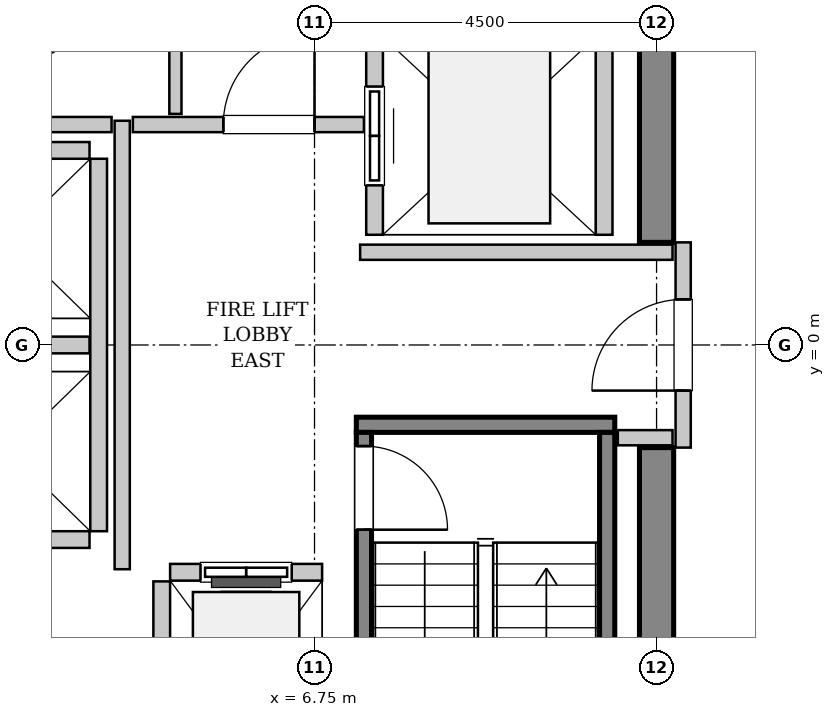
"""IFC4 building model, lengths in metres.
Left out: names, types, materials, properties, quantities, classifications, styles, units other than length and angle.
Written with IfcOpenShell. Run it as: python <this file> out.ifc"""

import sys

from ifc_helpers import new_model, si_unit, direction, frame, frame_2d, origin, place, context, subcontext, project, spatial, rectangle, extrude, source, transform, mapped, element, fill, save


model = new_model("IFC4")
c1 = context("Model", 3, precision=1e-05, world=origin(), true_north=direction((0.0, 1.0)))
c2 = subcontext(c1, "Body", "Model", "MODEL_VIEW")
j1 = project(units=[si_unit("LENGTHUNIT", "METRE"), si_unit("PLANEANGLEUNIT", "RADIAN")], contexts=[c1])
p1 = place(None, origin())
s1 = spatial("IfcSite", under=j1, at=p1, CompositionType="ELEMENT")
p2 = place(p1, origin())
s2 = spatial("IfcBuilding", under=s1, at=p2, CompositionType="ELEMENT")
p3 = place(p2, frame((0.0, 0.0, 252.2)))
s3 = spatial("IfcBuildingStorey", under=s2, at=p3, CompositionType="ELEMENT", Elevation=252.2)
m1 = source(origin(), c2, "Body", "SweptSolid", [
    extrude(rectangle(XDim=7.425, YDim=0.45, at=frame_2d((3.712, 0.0))), origin(), (0.0, 0.0, 1.0), 3.8),
])
for number, where, z_axis, x_axis in (
    (1, (11.25, -8.775, 0.0), (0.0, 0.0, 1.0), (0.0, 1.0, 0.0)),
    (2, (11.25, 1.35, 0.0), (0.0, 0.0, 1.0), (0.0, 1.0, 0.0)),
):
    element("IfcWall", number, at=place(p3, frame(where, z_axis=z_axis, x_axis=x_axis)), inside=s3, PredefinedType="SHEAR", context=c2, shape_type="MappedRepresentation", body=[
        mapped(m1, transform((0.0, 0.0, 0.0), x_axis=(1.0, 0.0, 0.0), y_axis=(0.0, 1.0, 0.0), z_axis=(0.0, 0.0, 1.0), scale=1.0)),
    ])
m2 = source(origin(), c2, "Body", "SweptSolid", [
    extrude(rectangle(XDim=3.4, YDim=0.2, at=frame_2d((1.7, 0.0))), origin(), (0.0, 0.0, 1.0), 3.8),
])
p4 = place(p3, frame((7.3, -1.05, 0.0), z_axis=(0.0, 0.0, 1.0), x_axis=(1.0, 0.0, 0.0)))
e3 = element("IfcWall", 3, at=p4, inside=s3, PredefinedType="SOLIDWALL", context=c2, shape_type="MappedRepresentation", body=[
    mapped(m2, transform((0.0, 0.0, 0.0), x_axis=(1.0, 0.0, 0.0), y_axis=(0.0, 1.0, 0.0), z_axis=(0.0, 0.0, 1.0), scale=1.0)),
])
m3 = source(origin(), c2, "Body", "SweptSolid", [
    extrude(rectangle(XDim=7.1, YDim=0.2, at=frame_2d((3.55, 0.0))), origin(), (0.0, 0.0, 1.0), 3.8),
])
p5 = place(p3, frame((7.4, -1.15, 0.0), z_axis=(0.0, 0.0, 1.0), x_axis=(0.0, -1.0, 0.0)))
e4 = element("IfcWall", 4, at=p5, inside=s3, PredefinedType="SOLIDWALL", context=c2, shape_type="MappedRepresentation", body=[
    mapped(m3, transform((0.0, 0.0, 0.0), x_axis=(1.0, 0.0, 0.0), y_axis=(0.0, 1.0, 0.0), z_axis=(0.0, 0.0, 1.0), scale=1.0)),
])
p6 = place(p5, frame((0.18, 0.0, 0.0)))
e5 = element("IfcOpeningElement", 5, at=p6, cuts=e4, PredefinedType="OPENING", context=c2, shape_type="SweptSolid", body=[
    extrude(rectangle(XDim=1.1, YDim=2.15, at=frame_2d((0.55, 1.075))), frame((0.0, 0.11, 0.0), z_axis=(0.0, -1.0, 0.0), x_axis=(1.0, 0.0, 0.0)), (0.0, 0.0, 1.0), 0.22),
])
p7 = place(p3, frame((10.6, -1.15, 0.0), z_axis=(0.0, 0.0, 1.0), x_axis=(0.0, -1.0, 0.0)))
e6 = element("IfcWall", 6, at=p7, inside=s3, PredefinedType="SOLIDWALL", context=c2, shape_type="MappedRepresentation", body=[
    mapped(m3, transform((0.0, 0.0, 0.0), x_axis=(1.0, 0.0, 0.0), y_axis=(0.0, 1.0, 0.0), z_axis=(0.0, 0.0, 1.0), scale=1.0)),
])
m4 = source(origin(), c2, "Body", "SweptSolid", [
    extrude(rectangle(XDim=2.0, YDim=0.22, at=frame_2d((1.0, 0.0))), origin(), (0.0, 0.0, 1.0), 3.535),
])
p8 = place(p3, frame((6.85, -2.99, 0.0), z_axis=(0.0, 0.0, 1.0), x_axis=(-1.0, 0.0, 0.0)))
e7 = element("IfcWall", 7, at=p8, inside=s3, PredefinedType="SOLIDWALL", context=c2, shape_type="MappedRepresentation", body=[
    mapped(m4, transform((0.0, 0.0, 0.0), x_axis=(1.0, 0.0, 0.0), y_axis=(0.0, 1.0, 0.0), z_axis=(0.0, 0.0, 1.0), scale=1.0)),
])
p9 = place(p8, frame((0.4, 0.0, 0.0)))
e8 = element("IfcOpeningElement", 8, at=p9, cuts=e7, PredefinedType="OPENING", context=c2, shape_type="SweptSolid", body=[
    extrude(rectangle(XDim=1.2, YDim=2.2, at=frame_2d((0.6, 1.1))), frame((0.0, 0.12, 0.0), z_axis=(0.0, -1.0, 0.0), x_axis=(1.0, 0.0, 0.0)), (0.0, 0.0, 1.0), 0.24),
])
m5 = source(origin(), c2, "Body", "SweptSolid", [
    extrude(rectangle(XDim=2.68, YDim=0.22, at=frame_2d((1.34, 0.0))), origin(), (0.0, 0.0, 1.0), 3.535),
])
p10 = place(p3, frame((4.74, -3.11, 0.0), z_axis=(0.0, 0.0, 1.0), x_axis=(0.0, -1.0, 0.0)))
e9 = element("IfcWall", 9, at=p10, inside=s3, PredefinedType="SOLIDWALL", context=c2, shape_type="MappedRepresentation", body=[
    mapped(m5, transform((0.0, 0.0, 0.0), x_axis=(1.0, 0.0, 0.0), y_axis=(0.0, 1.0, 0.0), z_axis=(0.0, 0.0, 1.0), scale=1.0)),
])
m6 = source(origin(), c2, "Body", "SweptSolid", [
    extrude(rectangle(XDim=5.45, YDim=0.22, at=frame_2d((2.725, 0.0))), origin(), (0.0, 0.0, 1.0), 3.535),
])
p11 = place(p3, frame((7.54, 6.9, 0.0), z_axis=(0.0, 0.0, 1.0), x_axis=(0.0, -1.0, 0.0)))
e10 = element("IfcWall", 10, at=p11, inside=s3, PredefinedType="SOLIDWALL", context=c2, shape_type="MappedRepresentation", body=[
    mapped(m6, transform((0.0, 0.0, 0.0), x_axis=(1.0, 0.0, 0.0), y_axis=(0.0, 1.0, 0.0), z_axis=(0.0, 0.0, 1.0), scale=1.0)),
])
p12 = place(p11, frame((3.5, 0.0, 0.0)))
e11 = element("IfcOpeningElement", 11, at=p12, cuts=e10, PredefinedType="OPENING", context=c2, shape_type="SweptSolid", body=[
    extrude(rectangle(XDim=1.3, YDim=2.3, at=frame_2d((0.65, 1.15))), frame((0.0, 0.12, 0.0), z_axis=(0.0, -1.0, 0.0), x_axis=(1.0, 0.0, 0.0)), (0.0, 0.0, 1.0), 0.24),
])
p13 = place(p11, frame((0.65, 0.0, 0.0)))
e12 = element("IfcOpeningElement", 12, at=p13, cuts=e10, PredefinedType="OPENING", context=c2, shape_type="SweptSolid", body=[
    extrude(rectangle(XDim=1.3, YDim=2.3, at=frame_2d((0.65, 1.15))), frame((0.0, 0.12, 0.0), z_axis=(0.0, -1.0, 0.0), x_axis=(1.0, 0.0, 0.0)), (0.0, 0.0, 1.0), 0.24),
])
p14 = place(p3, frame((10.56, 1.45, 0.0), z_axis=(0.0, 0.0, 1.0), x_axis=(0.0, 1.0, 0.0)))
e13 = element("IfcWall", 13, at=p14, inside=s3, PredefinedType="SOLIDWALL", context=c2, shape_type="MappedRepresentation", body=[
    mapped(m6, transform((0.0, 0.0, 0.0), x_axis=(1.0, 0.0, 0.0), y_axis=(0.0, 1.0, 0.0), z_axis=(0.0, 0.0, 1.0), scale=1.0)),
])
m7 = source(origin(), c2, "Body", "SweptSolid", [
    extrude(rectangle(XDim=4.9, YDim=0.22, at=frame_2d((2.45, 0.0))), origin(), (0.0, 0.0, 1.0), 3.535),
])
p15 = place(p3, frame((3.91, -2.45, 0.0), z_axis=(0.0, 0.0, 1.0), x_axis=(0.0, 1.0, 0.0)))
e14 = element("IfcWall", 14, at=p15, inside=s3, PredefinedType="SOLIDWALL", context=c2, shape_type="MappedRepresentation", body=[
    mapped(m7, transform((0.0, 0.0, 0.0), x_axis=(1.0, 0.0, 0.0), y_axis=(0.0, 1.0, 0.0), z_axis=(0.0, 0.0, 1.0), scale=1.0)),
])
m8 = source(origin(), c2, "Body", "SweptSolid", [
    extrude(rectangle(XDim=2.13, YDim=0.22, at=frame_2d((1.065, 0.0))), origin(), (0.0, 0.0, 1.0), 3.535),
])
for number, where, z_axis, x_axis in (
    (15, (1.66, -2.56, 0.0), (0.0, 0.0, 1.0), (1.0, 0.0, 0.0)),
    (16, (1.66, 0.0, 0.0), (0.0, 0.0, 1.0), (1.0, 0.0, 0.0)),
    (17, (3.79, 2.56, 0.0), (0.0, 0.0, 1.0), (-1.0, 0.0, 0.0)),
):
    element("IfcWall", number, at=place(p3, frame(where, z_axis=z_axis, x_axis=x_axis)), inside=s3, PredefinedType="SOLIDWALL", context=c2, shape_type="MappedRepresentation", body=[
        mapped(m8, transform((0.0, 0.0, 0.0), x_axis=(1.0, 0.0, 0.0), y_axis=(0.0, 1.0, 0.0), z_axis=(0.0, 0.0, 1.0), scale=1.0)),
    ])
m9 = source(origin(), c2, "Body", "SweptSolid", [
    extrude(rectangle(XDim=2.7, YDim=0.2, at=frame_2d((1.35, 0.0))), origin(), (0.0, 0.0, 1.0), 2.625),
])
p16 = place(p3, frame((11.6, -1.35, 0.0), z_axis=(0.0, 0.0, 1.0), x_axis=(0.0, 1.0, 0.0)))
e18 = element("IfcWall", 18, at=p16, inside=s3, PredefinedType="PARTITIONING", context=c2, shape_type="MappedRepresentation", body=[
    mapped(m9, transform((0.0, 0.0, 0.0), x_axis=(1.0, 0.0, 0.0), y_axis=(0.0, 1.0, 0.0), z_axis=(0.0, 0.0, 1.0), scale=1.0)),
])
p17 = place(p16, frame((0.75, 0.0, 0.0)))
e19 = element("IfcOpeningElement", 19, at=p17, cuts=e18, PredefinedType="OPENING", context=c2, shape_type="SweptSolid", body=[
    extrude(rectangle(XDim=1.2, YDim=2.15, at=frame_2d((0.6, 1.075))), frame((0.0, 0.11, 0.0), z_axis=(0.0, -1.0, 0.0), x_axis=(1.0, 0.0, 0.0)), (0.0, 0.0, 1.0), 0.22),
])
m10 = source(origin(), c2, "Body", "SweptSolid", [
    extrude(rectangle(XDim=5.9, YDim=0.2, at=frame_2d((2.95, 0.0))), origin(), (0.0, 0.0, 1.0), 3.535),
])
p18 = place(p3, frame((4.22, -2.95, 0.0), z_axis=(0.0, 0.0, 1.0), x_axis=(0.0, 1.0, 0.0)))
e20 = element("IfcWall", 20, at=p18, inside=s3, PredefinedType="PARTITIONING", context=c2, shape_type="MappedRepresentation", body=[
    mapped(m10, transform((0.0, 0.0, 0.0), x_axis=(1.0, 0.0, 0.0), y_axis=(0.0, 1.0, 0.0), z_axis=(0.0, 0.0, 1.0), scale=1.0)),
])
m11 = source(origin(), c2, "Body", "SweptSolid", [
    extrude(rectangle(XDim=2.52, YDim=0.2, at=frame_2d((1.26, 0.0))), origin(), (0.0, 0.0, 1.0), 3.535),
])
p19 = place(p3, frame((1.56, 2.9, 0.0), z_axis=(0.0, 0.0, 1.0), x_axis=(1.0, 0.0, 0.0)))
e21 = element("IfcWall", 21, at=p19, inside=s3, PredefinedType="PARTITIONING", context=c2, shape_type="MappedRepresentation", body=[
    mapped(m11, transform((0.0, 0.0, 0.0), x_axis=(1.0, 0.0, 0.0), y_axis=(0.0, 1.0, 0.0), z_axis=(0.0, 0.0, 1.0), scale=1.0)),
])
m12 = source(origin(), c2, "Body", "SweptSolid", [
    extrude(rectangle(XDim=3.04, YDim=0.2, at=frame_2d((1.52, 0.0))), origin(), (0.0, 0.0, 1.0), 3.535),
])
p20 = place(p3, frame((4.36, 2.9, 0.0), z_axis=(0.0, 0.0, 1.0), x_axis=(1.0, 0.0, 0.0)))
e22 = element("IfcWall", 22, at=p20, inside=s3, PredefinedType="PARTITIONING", context=c2, shape_type="MappedRepresentation", body=[
    mapped(m12, transform((0.0, 0.0, 0.0), x_axis=(1.0, 0.0, 0.0), y_axis=(0.0, 1.0, 0.0), z_axis=(0.0, 0.0, 1.0), scale=1.0)),
])
p21 = place(p20, frame((1.19, 0.0, 0.0)))
e23 = element("IfcOpeningElement", 23, at=p21, cuts=e22, PredefinedType="OPENING", context=c2, shape_type="SweptSolid", body=[
    extrude(rectangle(XDim=1.2, YDim=2.15, at=frame_2d((0.6, 1.075))), frame((0.0, 0.11, 0.0), z_axis=(0.0, -1.0, 0.0), x_axis=(1.0, 0.0, 0.0)), (0.0, 0.0, 1.0), 0.22),
])
m13 = source(origin(), c2, "Body", "SweptSolid", [
    extrude(rectangle(XDim=4.11, YDim=0.2, at=frame_2d((2.055, 0.0))), origin(), (0.0, 0.0, 1.0), 3.535),
])
p22 = place(p3, frame((7.35, 1.22, 0.0), z_axis=(0.0, 0.0, 1.0), x_axis=(1.0, 0.0, 0.0)))
e24 = element("IfcWall", 24, at=p22, inside=s3, PredefinedType="PARTITIONING", context=c2, shape_type="MappedRepresentation", body=[
    mapped(m13, transform((0.0, 0.0, 0.0), x_axis=(1.0, 0.0, 0.0), y_axis=(0.0, 1.0, 0.0), z_axis=(0.0, 0.0, 1.0), scale=1.0)),
])
m14 = source(origin(), c2, "Body", "SweptSolid", [
    extrude(rectangle(XDim=0.72, YDim=0.2, at=frame_2d((0.36, 0.0))), origin(), (0.0, 0.0, 1.0), 3.535),
])
p23 = place(p3, frame((10.74, -1.22, 0.0), z_axis=(0.0, 0.0, 1.0), x_axis=(1.0, 0.0, 0.0)))
e25 = element("IfcWall", 25, at=p23, inside=s3, PredefinedType="PARTITIONING", context=c2, shape_type="MappedRepresentation", body=[
    mapped(m14, transform((0.0, 0.0, 0.0), x_axis=(1.0, 0.0, 0.0), y_axis=(0.0, 1.0, 0.0), z_axis=(0.0, 0.0, 1.0), scale=1.0)),
])
m15 = source(origin(), c2, "Body", "SweptSolid", [
    extrude(rectangle(XDim=5.45, YDim=0.16, at=frame_2d((2.725, 0.0))), origin(), (0.0, 0.0, 1.0), 3.535),
])
p24 = place(p3, frame((4.92, 3.04, 0.0), z_axis=(0.0, 0.0, 1.0), x_axis=(0.0, 1.0, 0.0)))
e26 = element("IfcWall", 26, at=p24, inside=s3, PredefinedType="PARTITIONING", context=c2, shape_type="MappedRepresentation", body=[
    mapped(m15, transform((0.0, 0.0, 0.0), x_axis=(1.0, 0.0, 0.0), y_axis=(0.0, 1.0, 0.0), z_axis=(0.0, 0.0, 1.0), scale=1.0)),
])
m16 = source(origin(), c2, "Body", "SweptSolid", [
    extrude(rectangle(XDim=1.1, YDim=2.15, at=frame_2d((0.55, 1.075))), frame((0.0, 0.025, 0.0), z_axis=(0.0, -1.0, 0.0), x_axis=(1.0, 0.0, 0.0)), (0.0, 0.0, 1.0), 0.05),
])
p25 = place(p6, origin())
e27 = element("IfcDoor", 27, at=p25, inside=s3, OperationType="SINGLE_SWING_RIGHT", PredefinedType="DOOR", context=c2, shape_type="MappedRepresentation", body=[
    mapped(m16, transform((0.0, 0.0, 0.0), x_axis=(1.0, 0.0, 0.0), y_axis=(0.0, 1.0, 0.0), z_axis=(0.0, 0.0, 1.0), scale=1.0)),
])
fill(e5, e27)
m17 = source(origin(), c2, "Body", "SweptSolid", [
    extrude(rectangle(XDim=1.2, YDim=2.2, at=frame_2d((0.6, 1.1))), frame((0.0, 0.025, 0.0), z_axis=(0.0, -1.0, 0.0), x_axis=(1.0, 0.0, 0.0)), (0.0, 0.0, 1.0), 0.05),
])
p26 = place(p9, origin())
e28 = element("IfcDoor", 28, at=p26, inside=s3, OperationType="SLIDING_TO_LEFT", PredefinedType="DOOR", context=c2, shape_type="MappedRepresentation", body=[
    mapped(m17, transform((0.0, 0.0, 0.0), x_axis=(1.0, 0.0, 0.0), y_axis=(0.0, 1.0, 0.0), z_axis=(0.0, 0.0, 1.0), scale=1.0)),
])
fill(e8, e28)
m18 = source(origin(), c2, "Body", "SweptSolid", [
    extrude(rectangle(XDim=1.3, YDim=2.3, at=frame_2d((0.65, 1.15))), frame((0.0, 0.025, 0.0), z_axis=(0.0, -1.0, 0.0), x_axis=(1.0, 0.0, 0.0)), (0.0, 0.0, 1.0), 0.05),
])
p27 = place(p12, origin())
e29 = element("IfcDoor", 29, at=p27, inside=s3, OperationType="SLIDING_TO_RIGHT", PredefinedType="DOOR", context=c2, shape_type="MappedRepresentation", body=[
    mapped(m18, transform((0.0, 0.0, 0.0), x_axis=(1.0, 0.0, 0.0), y_axis=(0.0, 1.0, 0.0), z_axis=(0.0, 0.0, 1.0), scale=1.0)),
])
fill(e11, e29)
m19 = source(origin(), c2, "Body", "SweptSolid", [
    extrude(rectangle(XDim=1.2, YDim=2.15, at=frame_2d((0.6, 1.075))), frame((0.0, 0.025, 0.0), z_axis=(0.0, -1.0, 0.0), x_axis=(1.0, 0.0, 0.0)), (0.0, 0.0, 1.0), 0.05),
])
p28 = place(p17, origin())
e30 = element("IfcDoor", 30, at=p28, inside=s3, OperationType="SINGLE_SWING_LEFT", PredefinedType="DOOR", context=c2, shape_type="MappedRepresentation", body=[
    mapped(m19, transform((0.0, 0.0, 0.0), x_axis=(1.0, 0.0, 0.0), y_axis=(0.0, 1.0, 0.0), z_axis=(0.0, 0.0, 1.0), scale=1.0)),
])
fill(e19, e30)
p29 = place(p21, origin())
e31 = element("IfcDoor", 31, at=p29, inside=s3, OperationType="SINGLE_SWING_RIGHT", PredefinedType="DOOR", context=c2, shape_type="MappedRepresentation", body=[
    mapped(m19, transform((0.0, 0.0, 0.0), x_axis=(1.0, 0.0, 0.0), y_axis=(0.0, 1.0, 0.0), z_axis=(0.0, 0.0, 1.0), scale=1.0)),
])
fill(e23, e31)
save(model, sys.argv[1])
